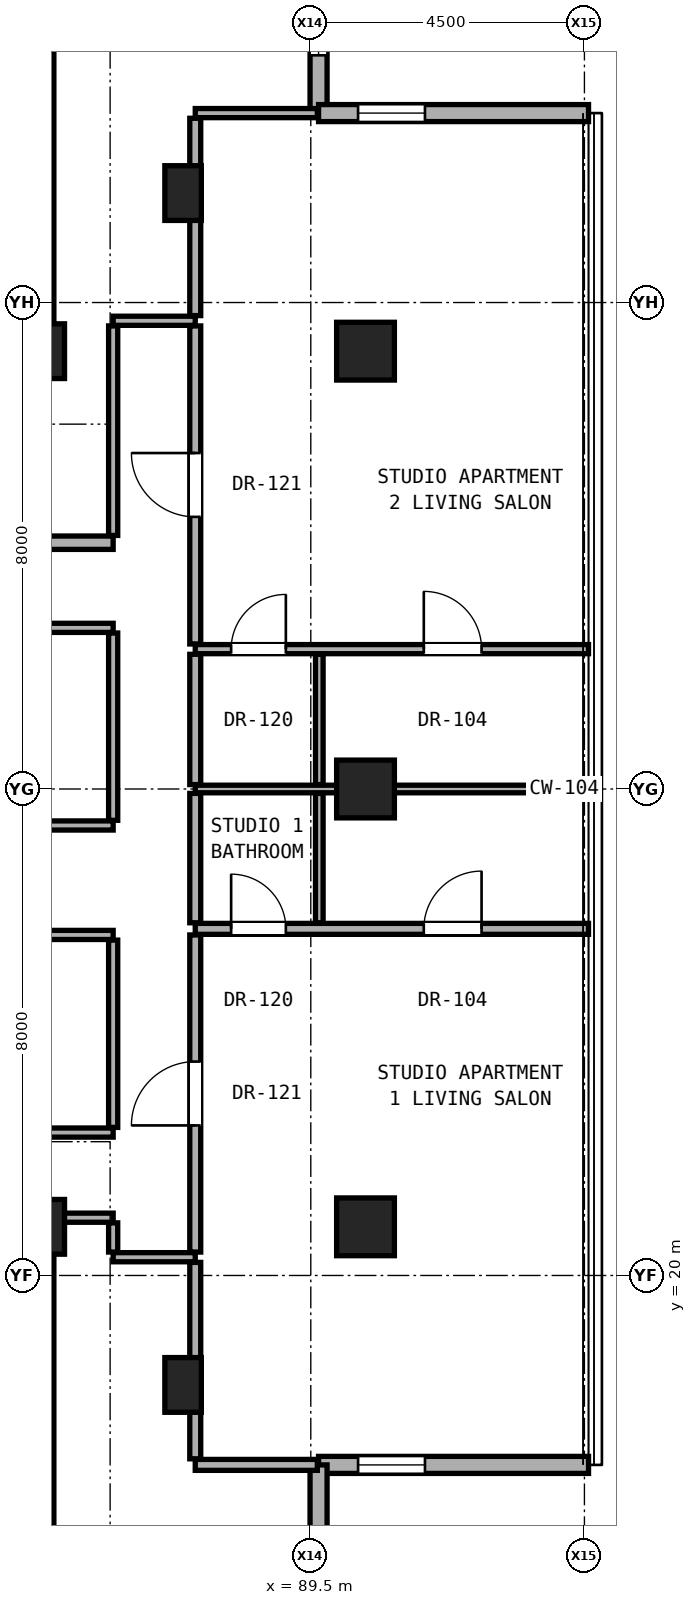
"""IFC4 building model, lengths in metres.
Left out: names, types, materials, properties, quantities, classifications, styles, units other than length and angle.
Written with IfcOpenShell. Run it as: python <this file> out.ifc"""

import sys

from ifc_helpers import new_model, si_unit, direction, frame, frame_2d, origin, origin_2d, place, context, subcontext, project, spatial, rectangle, hollow_rectangle, extrude, element, fill, save


model = new_model("IFC4")
c1 = context("Model", 3, precision=1e-05, world=origin(), true_north=direction((0.0, 1.0)))
c2 = subcontext(c1, "Body", "Model", "MODEL_VIEW")
j1 = project(units=[si_unit("LENGTHUNIT", "METRE"), si_unit("PLANEANGLEUNIT", "RADIAN")], contexts=[c1])
p1 = place(None, origin())
s1 = spatial("IfcSite", under=j1, at=p1, CompositionType="ELEMENT")
p2 = place(p1, origin())
s2 = spatial("IfcBuilding", under=s1, at=p2, CompositionType="ELEMENT")
p3 = place(p2, frame((0.0, 0.0, 199.9)))
s3 = spatial("IfcBuildingStorey", under=s2, at=p3, CompositionType="ELEMENT", Elevation=199.9)
for number, where, z_axis, x_axis in (
    (1, (85.0, 20.8, 0.0), (0.0, 0.0, 1.0), (1.0, 0.0, 0.0)),
    (2, (85.0, 35.2, 0.0), (0.0, 0.0, 1.0), (1.0, 0.0, 0.0)),
):
    element("IfcColumn", number, at=place(p3, frame(where, z_axis=z_axis, x_axis=x_axis)), inside=s3, PredefinedType="COLUMN", context=c2, shape_type="SweptSolid", body=[
        extrude(rectangle(XDim=0.9, YDim=0.9, at=origin_2d()), origin(), (0.0, 0.0, 1.0), 3.25),
    ])
for number, where, z_axis, x_axis in (
    (3, (90.4, 20.8, 0.0), (0.0, 0.0, 1.0), (1.0, 0.0, 0.0)),
    (4, (90.4, 28.0, 0.0), (0.0, 0.0, 1.0), (1.0, 0.0, 0.0)),
    (5, (90.4, 35.2, 0.0), (0.0, 0.0, 1.0), (1.0, 0.0, 0.0)),
):
    element("IfcColumn", number, at=place(p3, frame(where, z_axis=z_axis, x_axis=x_axis)), inside=s3, PredefinedType="COLUMN", context=c2, shape_type="SweptSolid", body=[
        extrude(hollow_rectangle(XDim=0.95, YDim=0.95, WallThickness=0.05, at=origin_2d()), origin(), (0.0, 0.0, 1.0), 3.25),
    ])
for number, where, z_axis, x_axis in (
    (6, (87.4, 18.2, 0.0), (0.0, 0.0, 1.0), (1.0, 0.0, 0.0)),
    (7, (87.4, 37.8, 0.0), (0.0, 0.0, 1.0), (1.0, 0.0, 0.0)),
):
    element("IfcColumn", number, at=place(p3, frame(where, z_axis=z_axis, x_axis=x_axis)), inside=s3, PredefinedType="PILASTER", context=c2, shape_type="SweptSolid", body=[
        extrude(rectangle(XDim=0.6, YDim=0.9, at=origin_2d()), origin(), (0.0, 0.0, 1.0), 3.25),
    ])
for number, where, z_axis, x_axis in (
    (8, (85.0, 35.2, 0.0), (0.0, 0.0, 1.0), (0.0, 1.0, 0.0)),
    (9, (85.0, 15.2, 0.0), (0.0, 0.0, 1.0), (0.0, 1.0, 0.0)),
):
    element("IfcWall", number, at=place(p3, frame(where, z_axis=z_axis, x_axis=x_axis)), inside=s3, PredefinedType="SHEAR", context=c2, shape_type="SweptSolid", body=[
        extrude(rectangle(XDim=5.6, YDim=0.55, at=frame_2d((2.8, 0.0))), origin(), (0.0, 0.0, 1.0), 3.05),
    ])
p4 = place(p3, frame((89.628, 39.115, 0.0), z_axis=(0.0, 0.0, 1.0), x_axis=(0.0, 1.0, 0.0)))
e10 = element("IfcWall", 10, at=p4, inside=s3, PredefinedType="SOLIDWALL", context=c2, shape_type="SweptSolid", body=[
    extrude(rectangle(XDim=4.44, YDim=0.28, at=frame_2d((2.22, 0.0))), origin(), (0.0, 0.0, 1.0), 3.03),
])
p5 = place(p4, frame((0.95, 0.0, 0.85)))
e11 = element("IfcOpeningElement", 11, at=p5, cuts=e10, PredefinedType="OPENING", context=c2, shape_type="SweptSolid", body=[
    extrude(rectangle(XDim=1.1, YDim=2.0, at=frame_2d((0.55, 1.0))), frame((0.0, 0.15, 0.0), z_axis=(0.0, -1.0, 0.0), x_axis=(1.0, 0.0, 0.0)), (0.0, 0.0, 1.0), 0.3),
])
p6 = place(p3, frame((89.628, 16.885, 0.0), z_axis=(0.0, 0.0, 1.0), x_axis=(1.0, 0.0, 0.0)))
e12 = element("IfcWall", 12, at=p6, inside=s3, PredefinedType="SOLIDWALL", context=c2, shape_type="SweptSolid", body=[
    extrude(rectangle(XDim=4.44, YDim=0.28, at=frame_2d((2.22, 0.0))), origin(), (0.0, 0.0, 1.0), 3.03),
])
p7 = place(p6, frame((0.65, 0.0, 0.85)))
e13 = element("IfcOpeningElement", 13, at=p7, cuts=e12, PredefinedType="OPENING", context=c2, shape_type="SweptSolid", body=[
    extrude(rectangle(XDim=1.1, YDim=2.0, at=frame_2d((0.55, 1.0))), frame((0.0, 0.15, 0.0), z_axis=(0.0, -1.0, 0.0), x_axis=(1.0, 0.0, 0.0)), (0.0, 0.0, 1.0), 0.3),
])
p8 = place(p3, frame((89.628, 12.445, 0.0), z_axis=(0.0, 0.0, 1.0), x_axis=(0.0, 1.0, 0.0)))
e14 = element("IfcWall", 14, at=p8, inside=s3, PredefinedType="SOLIDWALL", context=c2, shape_type="SweptSolid", body=[
    extrude(rectangle(XDim=4.44, YDim=0.28, at=frame_2d((2.22, 0.0))), origin(), (0.0, 0.0, 1.0), 3.03),
])
p9 = place(p3, frame((94.067, 39.115, 0.0), z_axis=(0.0, 0.0, 1.0), x_axis=(-1.0, 0.0, 0.0)))
e15 = element("IfcWall", 15, at=p9, inside=s3, PredefinedType="SOLIDWALL", context=c2, shape_type="SweptSolid", body=[
    extrude(rectangle(XDim=4.44, YDim=0.28, at=frame_2d((2.22, 0.0))), origin(), (0.0, 0.0, 1.0), 3.03),
])
p10 = place(p9, frame((2.69, 0.0, 0.85)))
e16 = element("IfcOpeningElement", 16, at=p10, cuts=e15, PredefinedType="OPENING", context=c2, shape_type="SweptSolid", body=[
    extrude(rectangle(XDim=1.1, YDim=2.0, at=frame_2d((0.55, 1.0))), frame((0.0, 0.15, 0.0), z_axis=(0.0, -1.0, 0.0), x_axis=(1.0, 0.0, 0.0)), (0.0, 0.0, 1.0), 0.3),
])
p11 = place(p3, frame((87.6, 16.885, 0.0), z_axis=(0.0, 0.0, 1.0), x_axis=(1.0, 0.0, 0.0)))
e17 = element("IfcWall", 17, at=p11, inside=s3, PredefinedType="PARTITIONING", context=c2, shape_type="SweptSolid", body=[
    extrude(rectangle(XDim=2.008, YDim=0.18, at=frame_2d((1.004, 0.0))), origin(), (0.0, 0.0, 1.0), 3.05),
])
p12 = place(p3, frame((86.25, 20.3, 0.0), z_axis=(0.0, 0.0, 1.0), x_axis=(1.0, 0.0, 0.0)))
e18 = element("IfcWall", 18, at=p12, inside=s3, PredefinedType="PARTITIONING", context=c2, shape_type="SweptSolid", body=[
    extrude(rectangle(XDim=1.35, YDim=0.15, at=frame_2d((0.675, 0.0))), origin(), (0.0, 0.0, 1.0), 3.05),
])
p13 = place(p3, frame((85.27, 20.95, 0.0), z_axis=(0.0, 0.0, 1.0), x_axis=(1.0, 0.0, 0.0)))
e19 = element("IfcWall", 19, at=p13, inside=s3, PredefinedType="PARTITIONING", context=c2, shape_type="SweptSolid", body=[
    extrude(rectangle(XDim=0.98, YDim=0.15, at=frame_2d((0.49, 0.0))), origin(), (0.0, 0.0, 1.0), 2.442),
])
p14 = place(p3, frame((78.64, 22.35, 0.0), z_axis=(0.0, 0.0, 1.0), x_axis=(1.0, 0.0, 0.0)))
e20 = element("IfcWall", 20, at=p14, inside=s3, PredefinedType="PARTITIONING", context=c2, shape_type="SweptSolid", body=[
    extrude(rectangle(XDim=7.61, YDim=0.15, at=frame_2d((3.805, 0.0))), origin(), (0.0, 0.0, 1.0), 2.186),
])
p15 = place(p14, frame((3.33, 0.0, 0.0)))
e21 = element("IfcOpeningElement", 21, at=p15, cuts=e20, PredefinedType="OPENING", context=c2, shape_type="SweptSolid", body=[
    extrude(rectangle(XDim=0.95, YDim=2.15, at=frame_2d((0.475, 1.075))), frame((0.0, 0.085, 0.0), z_axis=(0.0, -1.0, 0.0), x_axis=(1.0, 0.0, 0.0)), (0.0, 0.0, 1.0), 0.17),
])
p16 = place(p3, frame((78.6, 25.6, 0.0), z_axis=(0.0, 0.0, 1.0), x_axis=(1.0, 0.0, 0.0)))
e22 = element("IfcWall", 22, at=p16, inside=s3, PredefinedType="PARTITIONING", context=c2, shape_type="SweptSolid", body=[
    extrude(rectangle(XDim=7.65, YDim=0.15, at=frame_2d((3.825, 0.0))), origin(), (0.0, 0.0, 1.0), 2.186),
])
p17 = place(p3, frame((87.6, 25.7, 0.0), z_axis=(0.0, 0.0, 1.0), x_axis=(1.0, 0.0, 0.0)))
e23 = element("IfcWall", 23, at=p17, inside=s3, PredefinedType="PARTITIONING", context=c2, shape_type="SweptSolid", body=[
    extrude(rectangle(XDim=6.467, YDim=0.18, at=frame_2d((3.233, 0.0))), origin(), (0.0, 0.0, 1.0), 2.269),
])
p18 = place(p17, frame((3.759, 0.0, 0.0)))
e24 = element("IfcOpeningElement", 24, at=p18, cuts=e23, PredefinedType="OPENING", context=c2, shape_type="SweptSolid", body=[
    extrude(rectangle(XDim=0.95, YDim=2.15, at=frame_2d((0.475, 1.075))), frame((0.0, 0.1, 0.0), z_axis=(0.0, -1.0, 0.0), x_axis=(1.0, 0.0, 0.0)), (0.0, 0.0, 1.0), 0.2),
])
p19 = place(p17, frame((0.59, 0.0, 0.0)))
e25 = element("IfcOpeningElement", 25, at=p19, cuts=e23, PredefinedType="OPENING", context=c2, shape_type="SweptSolid", body=[
    extrude(rectangle(XDim=0.9, YDim=2.1, at=frame_2d((0.45, 1.05))), frame((0.0, 0.1, 0.0), z_axis=(0.0, -1.0, 0.0), x_axis=(1.0, 0.0, 0.0)), (0.0, 0.0, 1.0), 0.2),
])
p20 = place(p3, frame((78.6, 27.4, 0.0), z_axis=(0.0, 0.0, 1.0), x_axis=(1.0, 0.0, 0.0)))
e26 = element("IfcWall", 26, at=p20, inside=s3, PredefinedType="PARTITIONING", context=c2, shape_type="SweptSolid", body=[
    extrude(rectangle(XDim=7.65, YDim=0.15, at=frame_2d((3.825, 0.0))), origin(), (0.0, 0.0, 1.0), 2.186),
])
p21 = place(p3, frame((87.6, 28.0, 0.0), z_axis=(0.0, 0.0, 1.0), x_axis=(1.0, 0.0, 0.0)))
e27 = element("IfcWall", 27, at=p21, inside=s3, PredefinedType="PARTITIONING", context=c2, shape_type="SweptSolid", body=[
    extrude(rectangle(XDim=6.467, YDim=0.125, at=frame_2d((3.233, 0.0))), origin(), (0.0, 0.0, 1.0), 2.269),
])
p22 = place(p3, frame((87.6, 30.3, 0.0), z_axis=(0.0, 0.0, 1.0), x_axis=(1.0, 0.0, 0.0)))
e28 = element("IfcWall", 28, at=p22, inside=s3, PredefinedType="PARTITIONING", context=c2, shape_type="SweptSolid", body=[
    extrude(rectangle(XDim=6.467, YDim=0.15, at=frame_2d((3.233, 0.0))), origin(), (0.0, 0.0, 1.0), 2.269),
])
p23 = place(p22, frame((3.759, 0.0, 0.0)))
e29 = element("IfcOpeningElement", 29, at=p23, cuts=e28, PredefinedType="OPENING", context=c2, shape_type="SweptSolid", body=[
    extrude(rectangle(XDim=0.95, YDim=2.15, at=frame_2d((0.475, 1.075))), frame((0.0, 0.085, 0.0), z_axis=(0.0, -1.0, 0.0), x_axis=(1.0, 0.0, 0.0)), (0.0, 0.0, 1.0), 0.17),
])
p24 = place(p22, frame((0.59, 0.0, 0.0)))
e30 = element("IfcOpeningElement", 30, at=p24, cuts=e28, PredefinedType="OPENING", context=c2, shape_type="SweptSolid", body=[
    extrude(rectangle(XDim=0.9, YDim=2.1, at=frame_2d((0.45, 1.05))), frame((0.0, 0.085, 0.0), z_axis=(0.0, -1.0, 0.0), x_axis=(1.0, 0.0, 0.0)), (0.0, 0.0, 1.0), 0.17),
])
p25 = place(p3, frame((78.64, 30.65, 0.0), z_axis=(0.0, 0.0, 1.0), x_axis=(1.0, 0.0, 0.0)))
e31 = element("IfcWall", 31, at=p25, inside=s3, PredefinedType="PARTITIONING", context=c2, shape_type="SweptSolid", body=[
    extrude(rectangle(XDim=7.61, YDim=0.15, at=frame_2d((3.805, 0.0))), origin(), (0.0, 0.0, 1.0), 2.186),
])
p26 = place(p25, frame((3.33, 0.0, 0.0)))
e32 = element("IfcOpeningElement", 32, at=p26, cuts=e31, PredefinedType="OPENING", context=c2, shape_type="SweptSolid", body=[
    extrude(rectangle(XDim=0.95, YDim=2.15, at=frame_2d((0.475, 1.075))), frame((0.0, 0.085, 0.0), z_axis=(0.0, -1.0, 0.0), x_axis=(1.0, 0.0, 0.0)), (0.0, 0.0, 1.0), 0.17),
])
p27 = place(p3, frame((71.55, 32.05, 0.0), z_axis=(0.0, 0.0, 1.0), x_axis=(1.0, 0.0, 0.0)))
e33 = element("IfcWall", 33, at=p27, inside=s3, PredefinedType="SOLIDWALL", context=c2, shape_type="SweptSolid", body=[
    extrude(rectangle(XDim=14.7, YDim=0.22, at=frame_2d((7.35, 0.0))), origin(), (0.0, 0.0, 1.0), 2.186),
])
p28 = place(p27, frame((6.065, 0.0, 0.0)))
e34 = element("IfcOpeningElement", 34, at=p28, cuts=e33, PredefinedType="OPENING", context=c2, shape_type="SweptSolid", body=[
    extrude(rectangle(XDim=0.85, YDim=2.01, at=frame_2d((0.425, 1.005))), frame((0.0, 0.12, 0.0), z_axis=(0.0, -1.0, 0.0), x_axis=(1.0, 0.0, 0.0)), (0.0, 0.0, 1.0), 0.24),
])
p29 = place(p27, frame((10.535, 0.0, 0.0)))
e35 = element("IfcOpeningElement", 35, at=p29, cuts=e33, PredefinedType="OPENING", context=c2, shape_type="SweptSolid", body=[
    extrude(rectangle(XDim=0.95, YDim=2.15, at=frame_2d((0.475, 1.075))), frame((0.0, 0.12, 0.0), z_axis=(0.0, -1.0, 0.0), x_axis=(1.0, 0.0, 0.0)), (0.0, 0.0, 1.0), 0.24),
])
p30 = place(p27, frame((1.65, 0.0, 0.0)))
e36 = element("IfcOpeningElement", 36, at=p30, cuts=e33, PredefinedType="OPENING", context=c2, shape_type="SweptSolid", body=[
    extrude(rectangle(XDim=0.85, YDim=2.01, at=frame_2d((0.425, 1.005))), frame((0.0, 0.12, 0.0), z_axis=(0.0, -1.0, 0.0), x_axis=(1.0, 0.0, 0.0)), (0.0, 0.0, 1.0), 0.24),
])
p31 = place(p3, frame((86.25, 35.7, 0.0), z_axis=(0.0, 0.0, 1.0), x_axis=(1.0, 0.0, 0.0)))
e37 = element("IfcWall", 37, at=p31, inside=s3, PredefinedType="PARTITIONING", context=c2, shape_type="SweptSolid", body=[
    extrude(rectangle(XDim=1.35, YDim=0.15, at=frame_2d((0.675, 0.0))), origin(), (0.0, 0.0, 1.0), 3.05),
])
p32 = place(p3, frame((87.6, 39.115, 0.0), z_axis=(0.0, 0.0, 1.0), x_axis=(1.0, 0.0, 0.0)))
e38 = element("IfcWall", 38, at=p32, inside=s3, PredefinedType="PARTITIONING", context=c2, shape_type="SweptSolid", body=[
    extrude(rectangle(XDim=2.008, YDim=0.15, at=frame_2d((1.004, 0.0))), origin(), (0.0, 0.0, 1.0), 3.05),
])
p33 = place(p3, frame((86.25, 20.385, 0.0), z_axis=(0.0, 0.0, 1.0), x_axis=(0.0, 1.0, 0.0)))
e39 = element("IfcWall", 39, at=p33, inside=s3, PredefinedType="PARTITIONING", context=c2, shape_type="SweptSolid", body=[
    extrude(rectangle(XDim=0.48, YDim=0.15, at=frame_2d((0.24, 0.0))), origin(), (0.0, 0.0, 1.0), 2.442),
])
p34 = place(p3, frame((86.25, 22.435, 0.0), z_axis=(0.0, 0.0, 1.0), x_axis=(0.0, 1.0, 0.0)))
e40 = element("IfcWall", 40, at=p34, inside=s3, PredefinedType="PARTITIONING", context=c2, shape_type="SweptSolid", body=[
    extrude(rectangle(XDim=3.08, YDim=0.15, at=frame_2d((1.54, 0.0))), origin(), (0.0, 0.0, 1.0), 3.05),
])
p35 = place(p3, frame((86.25, 27.485, 0.0), z_axis=(0.0, 0.0, 1.0), x_axis=(0.0, 1.0, 0.0)))
e41 = element("IfcWall", 41, at=p35, inside=s3, PredefinedType="PARTITIONING", context=c2, shape_type="SweptSolid", body=[
    extrude(rectangle(XDim=3.08, YDim=0.15, at=frame_2d((1.54, 0.0))), origin(), (0.0, 0.0, 1.0), 2.346),
])
p36 = place(p3, frame((86.25, 32.17, 0.0), z_axis=(0.0, 0.0, 1.0), x_axis=(0.0, 1.0, 0.0)))
e42 = element("IfcWall", 42, at=p36, inside=s3, PredefinedType="PARTITIONING", context=c2, shape_type="SweptSolid", body=[
    extrude(rectangle(XDim=3.445, YDim=0.15, at=frame_2d((1.723, 0.0))), origin(), (0.0, 0.0, 1.0), 2.442),
])
p37 = place(p3, frame((87.6, 16.985, 0.0), z_axis=(0.0, 0.0, 1.0), x_axis=(0.0, 1.0, 0.0)))
e43 = element("IfcWall", 43, at=p37, inside=s3, PredefinedType="PARTITIONING", context=c2, shape_type="SweptSolid", body=[
    extrude(rectangle(XDim=3.23, YDim=0.18, at=frame_2d((1.615, 0.0))), origin(), (0.0, 0.0, 1.0), 2.493),
])
p38 = place(p3, frame((87.6, 20.385, 0.0), z_axis=(0.0, 0.0, 1.0), x_axis=(0.0, 1.0, 0.0)))
e44 = element("IfcWall", 44, at=p38, inside=s3, PredefinedType="PARTITIONING", context=c2, shape_type="SweptSolid", body=[
    extrude(rectangle(XDim=5.215, YDim=0.18, at=frame_2d((2.607, 0.0))), origin(), (0.0, 0.0, 1.0), 2.442),
])
p39 = place(p38, frame((2.083, 0.0, 0.0)))
e45 = element("IfcOpeningElement", 45, at=p39, cuts=e44, PredefinedType="OPENING", context=c2, shape_type="SweptSolid", body=[
    extrude(rectangle(XDim=1.05, YDim=2.2, at=frame_2d((0.525, 1.1))), frame((0.0, 0.1, 0.0), z_axis=(0.0, -1.0, 0.0), x_axis=(1.0, 0.0, 0.0)), (0.0, 0.0, 1.0), 0.2),
])
p40 = place(p3, frame((87.6, 25.8, 0.0), z_axis=(0.0, 0.0, 1.0), x_axis=(0.0, 1.0, 0.0)))
e46 = element("IfcWall", 46, at=p40, inside=s3, PredefinedType="PARTITIONING", context=c2, shape_type="SweptSolid", body=[
    extrude(rectangle(XDim=2.127, YDim=0.18, at=frame_2d((1.064, 0.0))), origin(), (0.0, 0.0, 1.0), 2.346),
])
p41 = place(p3, frame((87.6, 28.073, 0.0), z_axis=(0.0, 0.0, 1.0), x_axis=(0.0, 1.0, 0.0)))
e47 = element("IfcWall", 47, at=p41, inside=s3, PredefinedType="PARTITIONING", context=c2, shape_type="SweptSolid", body=[
    extrude(rectangle(XDim=2.143, YDim=0.18, at=frame_2d((1.071, 0.0))), origin(), (0.0, 0.0, 1.0), 2.346),
])
p42 = place(p3, frame((87.6, 30.385, 0.0), z_axis=(0.0, 0.0, 1.0), x_axis=(0.0, 1.0, 0.0)))
e48 = element("IfcWall", 48, at=p42, inside=s3, PredefinedType="PARTITIONING", context=c2, shape_type="SweptSolid", body=[
    extrude(rectangle(XDim=5.23, YDim=0.18, at=frame_2d((2.615, 0.0))), origin(), (0.0, 0.0, 1.0), 2.442),
])
p43 = place(p42, frame((2.09, 0.0, 0.0)))
e49 = element("IfcOpeningElement", 49, at=p43, cuts=e48, PredefinedType="OPENING", context=c2, shape_type="SweptSolid", body=[
    extrude(rectangle(XDim=1.05, YDim=2.2, at=frame_2d((0.525, 1.1))), frame((0.0, 0.1, 0.0), z_axis=(0.0, -1.0, 0.0), x_axis=(1.0, 0.0, 0.0)), (0.0, 0.0, 1.0), 0.2),
])
p44 = place(p3, frame((87.6, 35.785, 0.0), z_axis=(0.0, 0.0, 1.0), x_axis=(0.0, 1.0, 0.0)))
e50 = element("IfcWall", 50, at=p44, inside=s3, PredefinedType="PARTITIONING", context=c2, shape_type="SweptSolid", body=[
    extrude(rectangle(XDim=3.245, YDim=0.18, at=frame_2d((1.623, 0.0))), origin(), (0.0, 0.0, 1.0), 2.493),
])
p45 = place(p3, frame((89.64, 25.8, 0.0), z_axis=(0.0, 0.0, 1.0), x_axis=(0.0, 1.0, 0.0)))
e51 = element("IfcWall", 51, at=p45, inside=s3, PredefinedType="PARTITIONING", context=c2, shape_type="SweptSolid", body=[
    extrude(rectangle(XDim=2.127, YDim=0.125, at=frame_2d((1.064, 0.0))), origin(), (0.0, 0.0, 1.0), 2.346),
])
p46 = place(p3, frame((89.64, 28.073, 0.0), z_axis=(0.0, 0.0, 1.0), x_axis=(0.0, 1.0, 0.0)))
e52 = element("IfcWall", 52, at=p46, inside=s3, PredefinedType="PARTITIONING", context=c2, shape_type="SweptSolid", body=[
    extrude(rectangle(XDim=2.143, YDim=0.125, at=frame_2d((1.071, 0.0))), origin(), (0.0, 0.0, 1.0), 2.346),
])
p47 = place(p5, origin())
e53 = element("IfcWindow", 53, at=p47, inside=s3, PartitioningType="SINGLE_PANEL", PredefinedType="WINDOW", context=c2, shape_type="SweptSolid", body=[
    extrude(rectangle(XDim=1.1, YDim=2.0, at=frame_2d((0.55, 1.0))), frame((0.0, 0.03, 0.0), z_axis=(0.0, -1.0, 0.0), x_axis=(1.0, 0.0, 0.0)), (0.0, 0.0, 1.0), 0.06),
])
fill(e11, e53)
p48 = place(p7, origin())
e54 = element("IfcWindow", 54, at=p48, inside=s3, PartitioningType="SINGLE_PANEL", PredefinedType="WINDOW", context=c2, shape_type="SweptSolid", body=[
    extrude(rectangle(XDim=1.1, YDim=2.0, at=frame_2d((0.55, 1.0))), frame((0.0, 0.03, 0.0), z_axis=(0.0, -1.0, 0.0), x_axis=(1.0, 0.0, 0.0)), (0.0, 0.0, 1.0), 0.06),
])
fill(e13, e54)
p49 = place(p10, origin())
e55 = element("IfcWindow", 55, at=p49, inside=s3, PartitioningType="SINGLE_PANEL", PredefinedType="WINDOW", context=c2, shape_type="SweptSolid", body=[
    extrude(rectangle(XDim=1.1, YDim=2.0, at=frame_2d((0.55, 1.0))), frame((0.0, 0.03, 0.0), z_axis=(0.0, -1.0, 0.0), x_axis=(1.0, 0.0, 0.0)), (0.0, 0.0, 1.0), 0.06),
])
fill(e16, e55)
p50 = place(p39, origin())
e56 = element("IfcDoor", 56, at=p50, inside=s3, OperationType="SINGLE_SWING_LEFT", PredefinedType="DOOR", context=c2, shape_type="SweptSolid", body=[
    extrude(rectangle(XDim=1.05, YDim=2.2, at=frame_2d((0.525, 1.1))), frame((0.0, 0.025, 0.0), z_axis=(0.0, -1.0, 0.0), x_axis=(1.0, 0.0, 0.0)), (0.0, 0.0, 1.0), 0.05),
])
fill(e45, e56)
p51 = place(p18, origin())
e57 = element("IfcDoor", 57, at=p51, inside=s3, OperationType="SINGLE_SWING_RIGHT", PredefinedType="DOOR", context=c2, shape_type="SweptSolid", body=[
    extrude(rectangle(XDim=0.95, YDim=2.15, at=frame_2d((0.475, 1.075))), frame((0.0, 0.025, 0.0), z_axis=(0.0, -1.0, 0.0), x_axis=(1.0, 0.0, 0.0)), (0.0, 0.0, 1.0), 0.05),
])
fill(e24, e57)
p52 = place(p19, origin())
e58 = element("IfcDoor", 58, at=p52, inside=s3, OperationType="SINGLE_SWING_LEFT", PredefinedType="DOOR", context=c2, shape_type="SweptSolid", body=[
    extrude(rectangle(XDim=0.9, YDim=2.1, at=frame_2d((0.45, 1.05))), frame((0.0, 0.025, 0.0), z_axis=(0.0, -1.0, 0.0), x_axis=(1.0, 0.0, 0.0)), (0.0, 0.0, 1.0), 0.05),
])
fill(e25, e58)
p53 = place(p43, origin())
e59 = element("IfcDoor", 59, at=p53, inside=s3, OperationType="SINGLE_SWING_RIGHT", PredefinedType="DOOR", context=c2, shape_type="SweptSolid", body=[
    extrude(rectangle(XDim=1.05, YDim=2.2, at=frame_2d((0.525, 1.1))), frame((0.0, 0.025, 0.0), z_axis=(0.0, -1.0, 0.0), x_axis=(1.0, 0.0, 0.0)), (0.0, 0.0, 1.0), 0.05),
])
fill(e49, e59)
p54 = place(p23, origin())
e60 = element("IfcDoor", 60, at=p54, inside=s3, OperationType="SINGLE_SWING_LEFT", PredefinedType="DOOR", context=c2, shape_type="SweptSolid", body=[
    extrude(rectangle(XDim=0.95, YDim=2.15, at=frame_2d((0.475, 1.075))), frame((0.0, 0.025, 0.0), z_axis=(0.0, -1.0, 0.0), x_axis=(1.0, 0.0, 0.0)), (0.0, 0.0, 1.0), 0.05),
])
fill(e29, e60)
p55 = place(p24, origin())
e61 = element("IfcDoor", 61, at=p55, inside=s3, OperationType="SINGLE_SWING_RIGHT", PredefinedType="DOOR", context=c2, shape_type="SweptSolid", body=[
    extrude(rectangle(XDim=0.9, YDim=2.1, at=frame_2d((0.45, 1.05))), frame((0.0, 0.025, 0.0), z_axis=(0.0, -1.0, 0.0), x_axis=(1.0, 0.0, 0.0)), (0.0, 0.0, 1.0), 0.05),
])
fill(e30, e61)
save(model, sys.argv[1])
